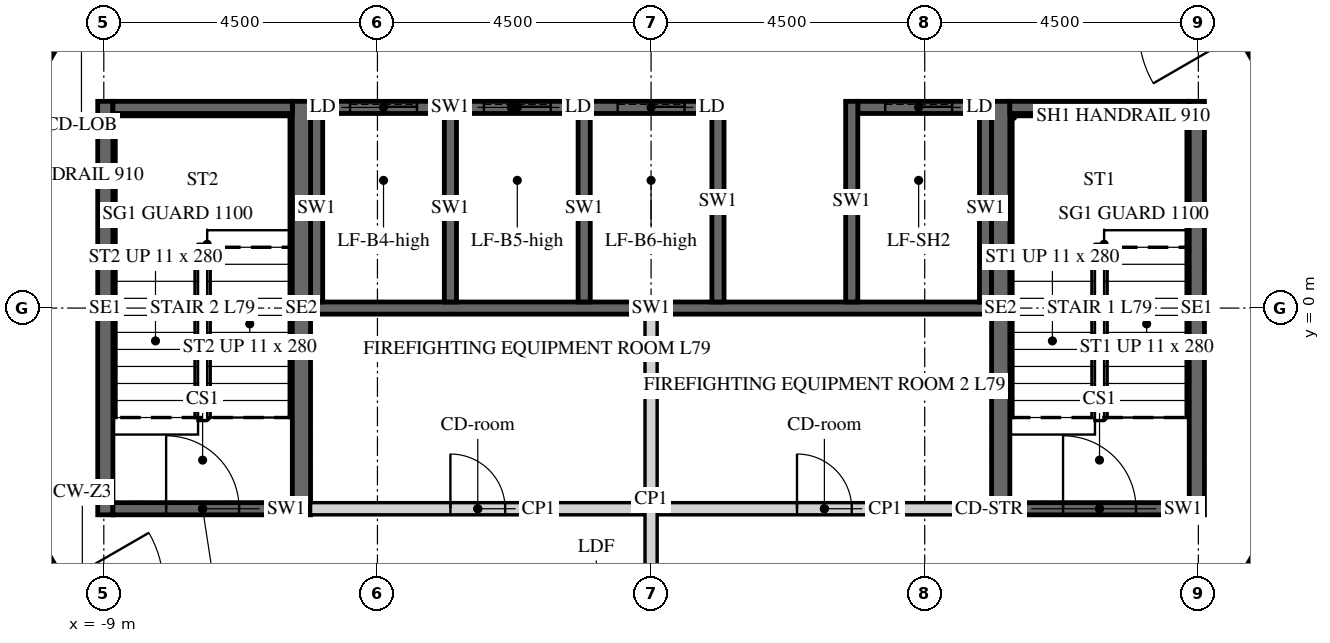
"""IFC4 building model, lengths in metres.
Left out: names, types, materials, properties, quantities, classifications, styles, units other than length and angle.
Written with IfcOpenShell. Run it as: python <this file> out.ifc"""

import sys

from ifc_helpers import new_model, si_unit, direction, frame, frame_2d, origin, place, context, subcontext, project, spatial, polyline, rectangle, outline, extrude, element, fill, save


model = new_model("IFC4")
c1 = context("Model", 3, precision=1e-05, world=origin(), true_north=direction((0.0, 1.0)))
c2 = subcontext(c1, "Body", "Model", "MODEL_VIEW")
j1 = project(units=[si_unit("LENGTHUNIT", "METRE"), si_unit("PLANEANGLEUNIT", "RADIAN")], contexts=[c1])
p1 = place(None, origin())
s1 = spatial("IfcSite", under=j1, at=p1, CompositionType="ELEMENT")
p2 = place(p1, origin())
s2 = spatial("IfcBuilding", under=s1, at=p2, CompositionType="ELEMENT")
p3 = place(p2, frame((0.0, 0.0, 326.4)))
s3 = spatial("IfcBuildingStorey", under=s2, at=p3, CompositionType="ELEMENT", Elevation=326.4)
p4 = place(p3, frame((-6.235, 10.8, -0.15), z_axis=(0.0, 0.0, 1.0), x_axis=(-0.499996419489, -0.866027470984, 0.0)))
e1 = element("IfcWall", 1, at=p4, inside=s3, PredefinedType="SHEAR", context=c2, shape_type="SweptSolid", body=[
    extrude(outline(polyline([(-0.115, -0.2), (12.586, -0.2), (12.355, 0.2), (0.115, 0.2), (-0.115, -0.2)])), origin(), (0.0, 0.0, 1.0), 3.9),
])
p5 = place(p4, frame((5.364, 0.0, 0.15)))
e2 = element("IfcOpeningElement", 2, at=p5, cuts=e1, PredefinedType="OPENING", context=c2, shape_type="SweptSolid", body=[
    extrude(rectangle(XDim=1.8, YDim=2.4, at=frame_2d((0.9, 1.2))), frame((0.0, 0.21, 0.0), z_axis=(0.0, -1.0, 0.0), x_axis=(1.0, 0.0, 0.0)), (0.0, 0.0, 1.0), 0.42),
])
p6 = place(p3, frame((-12.471, 0.0, -0.15), z_axis=(0.0, 0.0, 1.0), x_axis=(0.499996419489, -0.866027470984, 0.0)))
e3 = element("IfcWall", 3, at=p6, inside=s3, PredefinedType="SHEAR", context=c2, shape_type="SweptSolid", body=[
    extrude(outline(polyline([(-0.115, -0.2), (12.586, -0.2), (12.355, 0.2), (0.115, 0.2), (-0.115, -0.2)])), origin(), (0.0, 0.0, 1.0), 3.9),
])
p7 = place(p6, frame((5.306, 0.0, 0.15)))
e4 = element("IfcOpeningElement", 4, at=p7, cuts=e3, PredefinedType="OPENING", context=c2, shape_type="SweptSolid", body=[
    extrude(rectangle(XDim=1.8, YDim=2.4, at=frame_2d((0.9, 1.2))), frame((0.0, 0.21, 0.0), z_axis=(0.0, -1.0, 0.0), x_axis=(1.0, 0.0, 0.0)), (0.0, 0.0, 1.0), 0.42),
])
p8 = place(p3, frame((6.235, -10.8, -0.15), z_axis=(0.0, 0.0, 1.0), x_axis=(0.499996419489, 0.866027470984, 0.0)))
e5 = element("IfcWall", 5, at=p8, inside=s3, PredefinedType="SHEAR", context=c2, shape_type="SweptSolid", body=[
    extrude(outline(polyline([(-0.115, -0.2), (12.586, -0.2), (12.355, 0.2), (0.115, 0.2), (-0.115, -0.2)])), origin(), (0.0, 0.0, 1.0), 3.9),
])
p9 = place(p8, frame((5.364, 0.0, 0.15)))
e6 = element("IfcOpeningElement", 6, at=p9, cuts=e5, PredefinedType="OPENING", context=c2, shape_type="SweptSolid", body=[
    extrude(rectangle(XDim=1.8, YDim=2.4, at=frame_2d((0.9, 1.2))), frame((0.0, 0.21, 0.0), z_axis=(0.0, -1.0, 0.0), x_axis=(1.0, 0.0, 0.0)), (0.0, 0.0, 1.0), 0.42),
])
p10 = place(p3, frame((12.471, 0.0, -0.15), z_axis=(0.0, 0.0, 1.0), x_axis=(-0.499996419489, 0.866027470984, 0.0)))
e7 = element("IfcWall", 7, at=p10, inside=s3, PredefinedType="SHEAR", context=c2, shape_type="SweptSolid", body=[
    extrude(outline(polyline([(-0.115, -0.2), (12.586, -0.2), (12.355, 0.2), (0.115, 0.2), (-0.115, -0.2)])), origin(), (0.0, 0.0, 1.0), 3.9),
])
p11 = place(p10, frame((5.306, 0.0, 0.15)))
e8 = element("IfcOpeningElement", 8, at=p11, cuts=e7, PredefinedType="OPENING", context=c2, shape_type="SweptSolid", body=[
    extrude(rectangle(XDim=1.8, YDim=2.4, at=frame_2d((0.9, 1.2))), frame((0.0, 0.21, 0.0), z_axis=(0.0, -1.0, 0.0), x_axis=(1.0, 0.0, 0.0)), (0.0, 0.0, 1.0), 0.42),
])
p12 = place(p3, frame((-5.6, 3.3, -0.25), z_axis=(0.0, 0.0, 1.0), x_axis=(1.0, 0.0, 0.0)))
e9 = element("IfcWall", 9, at=p12, inside=s3, PredefinedType="SHEAR", context=c2, shape_type="SweptSolid", body=[
    extrude(rectangle(XDim=6.6, YDim=0.2, at=frame_2d((3.3, 0.0))), origin(), (0.0, 0.0, 1.0), 3.9),
])
p13 = place(p12, frame((0.65, 0.0, 0.25)))
e10 = element("IfcOpeningElement", 10, at=p13, cuts=e9, PredefinedType="OPENING", context=c2, shape_type="SweptSolid", body=[
    extrude(rectangle(XDim=1.1, YDim=2.1, at=frame_2d((0.55, 1.05))), frame((0.0, 0.11, 0.0), z_axis=(0.0, -1.0, 0.0), x_axis=(1.0, 0.0, 0.0)), (0.0, 0.0, 1.0), 0.22),
])
p14 = place(p12, frame((2.85, 0.0, 0.25)))
e11 = element("IfcOpeningElement", 11, at=p14, cuts=e9, PredefinedType="OPENING", context=c2, shape_type="SweptSolid", body=[
    extrude(rectangle(XDim=1.1, YDim=2.1, at=frame_2d((0.55, 1.05))), frame((0.0, 0.11, 0.0), z_axis=(0.0, -1.0, 0.0), x_axis=(1.0, 0.0, 0.0)), (0.0, 0.0, 1.0), 0.22),
])
p15 = place(p12, frame((5.05, 0.0, 0.25)))
e12 = element("IfcOpeningElement", 12, at=p15, cuts=e9, PredefinedType="OPENING", context=c2, shape_type="SweptSolid", body=[
    extrude(rectangle(XDim=1.1, YDim=2.1, at=frame_2d((0.55, 1.05))), frame((0.0, 0.11, 0.0), z_axis=(0.0, -1.0, 0.0), x_axis=(1.0, 0.0, 0.0)), (0.0, 0.0, 1.0), 0.22),
])
p16 = place(p3, frame((3.4, 3.3, -0.25), z_axis=(0.0, 0.0, 1.0), x_axis=(1.0, 0.0, 0.0)))
e13 = element("IfcWall", 13, at=p16, inside=s3, PredefinedType="SHEAR", context=c2, shape_type="SweptSolid", body=[
    extrude(rectangle(XDim=2.2, YDim=0.2, at=frame_2d((1.1, 0.0))), origin(), (0.0, 0.0, 1.0), 3.9),
])
p17 = place(p16, frame((0.45, 0.0, 0.25)))
e14 = element("IfcOpeningElement", 14, at=p17, cuts=e13, PredefinedType="OPENING", context=c2, shape_type="SweptSolid", body=[
    extrude(rectangle(XDim=1.1, YDim=2.1, at=frame_2d((0.55, 1.05))), frame((0.0, 0.11, 0.0), z_axis=(0.0, -1.0, 0.0), x_axis=(1.0, 0.0, 0.0)), (0.0, 0.0, 1.0), 0.22),
])
p18 = place(p3, frame((-5.6, 0.0, -0.25), z_axis=(0.0, 0.0, 1.0), x_axis=(1.0, 0.0, 0.0)))
e15 = element("IfcWall", 15, at=p18, inside=s3, PredefinedType="SHEAR", context=c2, shape_type="SweptSolid", body=[
    extrude(rectangle(XDim=11.2, YDim=0.2, at=frame_2d((5.6, 0.0))), origin(), (0.0, 0.0, 1.0), 3.9),
])
for number, where, z_axis, x_axis in (
    (16, (-5.5, 0.1, -0.25), (0.0, 0.0, 1.0), (0.0, 1.0, 0.0)),
    (17, (-3.3, 0.1, -0.25), (0.0, 0.0, 1.0), (0.0, 1.0, 0.0)),
    (18, (-1.1, 0.1, -0.25), (0.0, 0.0, 1.0), (0.0, 1.0, 0.0)),
):
    element("IfcWall", number, at=place(p3, frame(where, z_axis=z_axis, x_axis=x_axis)), inside=s3, PredefinedType="SHEAR", context=c2, shape_type="SweptSolid", body=[
        extrude(rectangle(XDim=3.1, YDim=0.2, at=frame_2d((1.55, 0.0))), origin(), (0.0, 0.0, 1.0), 3.9),
    ])
for number, where, z_axis, x_axis in (
    (19, (1.1, 0.1, -0.25), (0.0, 0.0, 1.0), (0.0, 1.0, 0.0)),
    (20, (3.3, 0.1, -0.25), (0.0, 0.0, 1.0), (0.0, 1.0, 0.0)),
):
    element("IfcWall", number, at=place(p3, frame(where, z_axis=z_axis, x_axis=x_axis)), inside=s3, PredefinedType="SHEAR", context=c2, shape_type="SweptSolid", body=[
        extrude(rectangle(XDim=3.3, YDim=0.2, at=frame_2d((1.65, 0.0))), origin(), (0.0, 0.0, 1.0), 3.9),
    ])
p19 = place(p3, frame((5.5, 0.1, -0.25), z_axis=(0.0, 0.0, 1.0), x_axis=(0.0, 1.0, 0.0)))
e21 = element("IfcWall", 21, at=p19, inside=s3, PredefinedType="SHEAR", context=c2, shape_type="SweptSolid", body=[
    extrude(rectangle(XDim=3.1, YDim=0.2, at=frame_2d((1.55, 0.0))), origin(), (0.0, 0.0, 1.0), 3.9),
])
p20 = place(p3, frame((-5.6, -3.3, 0.0), z_axis=(0.0, 0.0, 1.0), x_axis=(1.0, 0.0, 0.0)))
e22 = element("IfcWall", 22, at=p20, inside=s3, PredefinedType="PARTITIONING", context=c2, shape_type="SweptSolid", body=[
    extrude(rectangle(XDim=5.5, YDim=0.2, at=frame_2d((2.75, 0.0))), origin(), (0.0, 0.0, 1.0), 3.65),
])
p21 = place(p20, frame((2.3, 0.0, 0.0)))
e23 = element("IfcOpeningElement", 23, at=p21, cuts=e22, PredefinedType="OPENING", context=c2, shape_type="SweptSolid", body=[
    extrude(rectangle(XDim=0.9, YDim=2.1, at=frame_2d((0.45, 1.05))), frame((0.0, 0.11, 0.0), z_axis=(0.0, -1.0, 0.0), x_axis=(1.0, 0.0, 0.0)), (0.0, 0.0, 1.0), 0.22),
])
p22 = place(p3, frame((0.1, -3.3, 0.0), z_axis=(0.0, 0.0, 1.0), x_axis=(1.0, 0.0, 0.0)))
e24 = element("IfcWall", 24, at=p22, inside=s3, PredefinedType="PARTITIONING", context=c2, shape_type="SweptSolid", body=[
    extrude(rectangle(XDim=5.5, YDim=0.2, at=frame_2d((2.75, 0.0))), origin(), (0.0, 0.0, 1.0), 3.65),
])
p23 = place(p22, frame((2.3, 0.0, 0.0)))
e25 = element("IfcOpeningElement", 25, at=p23, cuts=e24, PredefinedType="OPENING", context=c2, shape_type="SweptSolid", body=[
    extrude(rectangle(XDim=0.9, YDim=2.1, at=frame_2d((0.45, 1.05))), frame((0.0, 0.11, 0.0), z_axis=(0.0, -1.0, 0.0), x_axis=(1.0, 0.0, 0.0)), (0.0, 0.0, 1.0), 0.22),
])
p24 = place(p3, frame((0.0, -6.2, 0.0), z_axis=(0.0, 0.0, 1.0), x_axis=(0.0, 1.0, 0.0)))
e26 = element("IfcWall", 26, at=p24, inside=s3, PredefinedType="PARTITIONING", context=c2, shape_type="SweptSolid", body=[
    extrude(rectangle(XDim=6.1, YDim=0.2, at=frame_2d((3.05, 0.0))), origin(), (0.0, 0.0, 1.0), 3.65),
])
p25 = place(p3, frame((5.75, -3.4, -0.25), z_axis=(0.0, 0.0, 1.0), x_axis=(0.0, 1.0, 0.0)))
e27 = element("IfcWall", 27, at=p25, inside=s3, PredefinedType="SHEAR", context=c2, shape_type="SweptSolid", body=[
    extrude(rectangle(XDim=6.8, YDim=0.3, at=frame_2d((3.4, 0.0))), origin(), (0.0, 0.0, 1.0), 3.9),
])
p26 = place(p3, frame((8.975, -3.4, -0.25), z_axis=(0.0, 0.0, 1.0), x_axis=(0.0, 1.0, 0.0)))
e28 = element("IfcWall", 28, at=p26, inside=s3, PredefinedType="SHEAR", context=c2, shape_type="SweptSolid", body=[
    extrude(rectangle(XDim=6.8, YDim=0.25, at=frame_2d((3.4, 0.0))), origin(), (0.0, 0.0, 1.0), 3.9),
])
p27 = place(p3, frame((5.9, 3.3, -0.25), z_axis=(0.0, 0.0, 1.0), x_axis=(1.0, 0.0, 0.0)))
e29 = element("IfcWall", 29, at=p27, inside=s3, PredefinedType="SHEAR", context=c2, shape_type="SweptSolid", body=[
    extrude(rectangle(XDim=2.95, YDim=0.2, at=frame_2d((1.475, 0.0))), origin(), (0.0, 0.0, 1.0), 3.9),
])
p28 = place(p3, frame((5.9, -3.3, -0.25), z_axis=(0.0, 0.0, 1.0), x_axis=(1.0, 0.0, 0.0)))
e30 = element("IfcWall", 30, at=p28, inside=s3, PredefinedType="SHEAR", context=c2, shape_type="SweptSolid", body=[
    extrude(rectangle(XDim=2.95, YDim=0.2, at=frame_2d((1.475, 0.0))), origin(), (0.0, 0.0, 1.0), 3.9),
])
p29 = place(p28, frame((0.875, 0.0, 0.25)))
e31 = element("IfcOpeningElement", 31, at=p29, cuts=e30, PredefinedType="OPENING", context=c2, shape_type="SweptSolid", body=[
    extrude(rectangle(XDim=1.2, YDim=2.4, at=frame_2d((0.6, 1.2))), frame((0.0, 0.11, 0.0), z_axis=(0.0, -1.0, 0.0), x_axis=(1.0, 0.0, 0.0)), (0.0, 0.0, 1.0), 0.22),
])
p30 = place(p3, frame((-5.75, -3.4, -0.25), z_axis=(0.0, 0.0, 1.0), x_axis=(0.0, 1.0, 0.0)))
e32 = element("IfcWall", 32, at=p30, inside=s3, PredefinedType="SHEAR", context=c2, shape_type="SweptSolid", body=[
    extrude(rectangle(XDim=6.8, YDim=0.3, at=frame_2d((3.4, 0.0))), origin(), (0.0, 0.0, 1.0), 3.9),
])
p31 = place(p3, frame((-8.975, -3.4, -0.25), z_axis=(0.0, 0.0, 1.0), x_axis=(0.0, 1.0, 0.0)))
e33 = element("IfcWall", 33, at=p31, inside=s3, PredefinedType="SHEAR", context=c2, shape_type="SweptSolid", body=[
    extrude(rectangle(XDim=6.8, YDim=0.25, at=frame_2d((3.4, 0.0))), origin(), (0.0, 0.0, 1.0), 3.9),
])
p32 = place(p3, frame((-8.85, 3.3, -0.25), z_axis=(0.0, 0.0, 1.0), x_axis=(1.0, 0.0, 0.0)))
e34 = element("IfcWall", 34, at=p32, inside=s3, PredefinedType="SHEAR", context=c2, shape_type="SweptSolid", body=[
    extrude(rectangle(XDim=2.95, YDim=0.2, at=frame_2d((1.475, 0.0))), origin(), (0.0, 0.0, 1.0), 3.9),
])
p33 = place(p3, frame((-8.85, -3.3, -0.25), z_axis=(0.0, 0.0, 1.0), x_axis=(1.0, 0.0, 0.0)))
e35 = element("IfcWall", 35, at=p33, inside=s3, PredefinedType="SHEAR", context=c2, shape_type="SweptSolid", body=[
    extrude(rectangle(XDim=2.95, YDim=0.2, at=frame_2d((1.475, 0.0))), origin(), (0.0, 0.0, 1.0), 3.9),
])
p34 = place(p33, frame((0.875, 0.0, 0.25)))
e36 = element("IfcOpeningElement", 36, at=p34, cuts=e35, PredefinedType="OPENING", context=c2, shape_type="SweptSolid", body=[
    extrude(rectangle(XDim=1.2, YDim=2.4, at=frame_2d((0.6, 1.2))), frame((0.0, 0.11, 0.0), z_axis=(0.0, -1.0, 0.0), x_axis=(1.0, 0.0, 0.0)), (0.0, 0.0, 1.0), 0.22),
])
p35 = place(p3, frame((-8.247, 16.625, 0.0), z_axis=(0.0, 0.0, 1.0), x_axis=(-0.438376416131, -0.89879147625, 0.0)))
e37 = element("IfcWall", 37, at=p35, inside=s3, PredefinedType="PARTITIONING", context=c2, shape_type="SweptSolid", body=[
    extrude(rectangle(XDim=16.606, YDim=0.15, at=frame_2d((8.303, 0.0))), origin(), (0.0, 0.0, 1.0), 2.838),
])
p36 = place(p35, frame((6.103, 0.0, 0.0)))
e38 = element("IfcOpeningElement", 38, at=p36, cuts=e37, PredefinedType="OPENING", context=c2, shape_type="SweptSolid", body=[
    extrude(rectangle(XDim=1.0, YDim=2.1, at=frame_2d((0.5, 1.05))), frame((0.0, 0.085, 0.0), z_axis=(0.0, -1.0, 0.0), x_axis=(1.0, 0.0, 0.0)), (0.0, 0.0, 1.0), 0.17),
])
p37 = place(p3, frame((18.521, -1.171, 0.0), z_axis=(0.0, 0.0, 1.0), x_axis=(-0.559191021435, 0.829038842001, 0.0)))
e39 = element("IfcWall", 39, at=p37, inside=s3, PredefinedType="PARTITIONING", context=c2, shape_type="SweptSolid", body=[
    extrude(rectangle(XDim=16.605, YDim=0.15, at=frame_2d((8.303, 0.0))), origin(), (0.0, 0.0, 1.0), 2.838),
])
p38 = place(p37, frame((9.703, 0.0, 0.0)))
e40 = element("IfcOpeningElement", 40, at=p38, cuts=e39, PredefinedType="OPENING", context=c2, shape_type="SweptSolid", body=[
    extrude(rectangle(XDim=1.0, YDim=2.1, at=frame_2d((0.5, 1.05))), frame((0.0, 0.085, 0.0), z_axis=(0.0, -1.0, 0.0), x_axis=(1.0, 0.0, 0.0)), (0.0, 0.0, 1.0), 0.17),
])
p39 = place(p21, origin())
e41 = element("IfcDoor", 41, at=p39, inside=s3, OperationType="SINGLE_SWING_LEFT", PredefinedType="DOOR", context=c2, shape_type="SweptSolid", body=[
    extrude(rectangle(XDim=0.9, YDim=2.1, at=frame_2d((0.45, 1.05))), frame((0.0, 0.025, 0.0), z_axis=(0.0, -1.0, 0.0), x_axis=(1.0, 0.0, 0.0)), (0.0, 0.0, 1.0), 0.05),
])
fill(e23, e41)
p40 = place(p23, origin())
e42 = element("IfcDoor", 42, at=p40, inside=s3, OperationType="SINGLE_SWING_LEFT", PredefinedType="DOOR", context=c2, shape_type="SweptSolid", body=[
    extrude(rectangle(XDim=0.9, YDim=2.1, at=frame_2d((0.45, 1.05))), frame((0.0, 0.025, 0.0), z_axis=(0.0, -1.0, 0.0), x_axis=(1.0, 0.0, 0.0)), (0.0, 0.0, 1.0), 0.05),
])
fill(e25, e42)
p41 = place(p29, origin())
e43 = element("IfcDoor", 43, at=p41, inside=s3, OperationType="SINGLE_SWING_LEFT", PredefinedType="DOOR", context=c2, shape_type="SweptSolid", body=[
    extrude(rectangle(XDim=1.2, YDim=2.4, at=frame_2d((0.6, 1.2))), frame((0.0, 0.025, 0.0), z_axis=(0.0, -1.0, 0.0), x_axis=(1.0, 0.0, 0.0)), (0.0, 0.0, 1.0), 0.05),
])
fill(e31, e43)
p42 = place(p34, origin())
e44 = element("IfcDoor", 44, at=p42, inside=s3, OperationType="SINGLE_SWING_LEFT", PredefinedType="DOOR", context=c2, shape_type="SweptSolid", body=[
    extrude(rectangle(XDim=1.2, YDim=2.4, at=frame_2d((0.6, 1.2))), frame((0.0, 0.025, 0.0), z_axis=(0.0, -1.0, 0.0), x_axis=(1.0, 0.0, 0.0)), (0.0, 0.0, 1.0), 0.05),
])
fill(e36, e44)
p43 = place(p13, origin())
e45 = element("IfcDoor", 45, at=p43, inside=s3, OperationType="SLIDING_TO_LEFT", PredefinedType="DOOR", context=c2, shape_type="SweptSolid", body=[
    extrude(rectangle(XDim=1.1, YDim=2.1, at=frame_2d((0.55, 1.05))), frame((0.0, 0.025, 0.0), z_axis=(0.0, -1.0, 0.0), x_axis=(1.0, 0.0, 0.0)), (0.0, 0.0, 1.0), 0.05),
])
fill(e10, e45)
p44 = place(p14, origin())
e46 = element("IfcDoor", 46, at=p44, inside=s3, OperationType="SLIDING_TO_LEFT", PredefinedType="DOOR", context=c2, shape_type="SweptSolid", body=[
    extrude(rectangle(XDim=1.1, YDim=2.1, at=frame_2d((0.55, 1.05))), frame((0.0, 0.025, 0.0), z_axis=(0.0, -1.0, 0.0), x_axis=(1.0, 0.0, 0.0)), (0.0, 0.0, 1.0), 0.05),
])
fill(e11, e46)
p45 = place(p15, origin())
e47 = element("IfcDoor", 47, at=p45, inside=s3, OperationType="SLIDING_TO_LEFT", PredefinedType="DOOR", context=c2, shape_type="SweptSolid", body=[
    extrude(rectangle(XDim=1.1, YDim=2.1, at=frame_2d((0.55, 1.05))), frame((0.0, 0.025, 0.0), z_axis=(0.0, -1.0, 0.0), x_axis=(1.0, 0.0, 0.0)), (0.0, 0.0, 1.0), 0.05),
])
fill(e12, e47)
p46 = place(p17, origin())
e48 = element("IfcDoor", 48, at=p46, inside=s3, OperationType="SLIDING_TO_LEFT", PredefinedType="DOOR", context=c2, shape_type="SweptSolid", body=[
    extrude(rectangle(XDim=1.1, YDim=2.1, at=frame_2d((0.55, 1.05))), frame((0.0, 0.025, 0.0), z_axis=(0.0, -1.0, 0.0), x_axis=(1.0, 0.0, 0.0)), (0.0, 0.0, 1.0), 0.05),
])
fill(e14, e48)
save(model, sys.argv[1])
